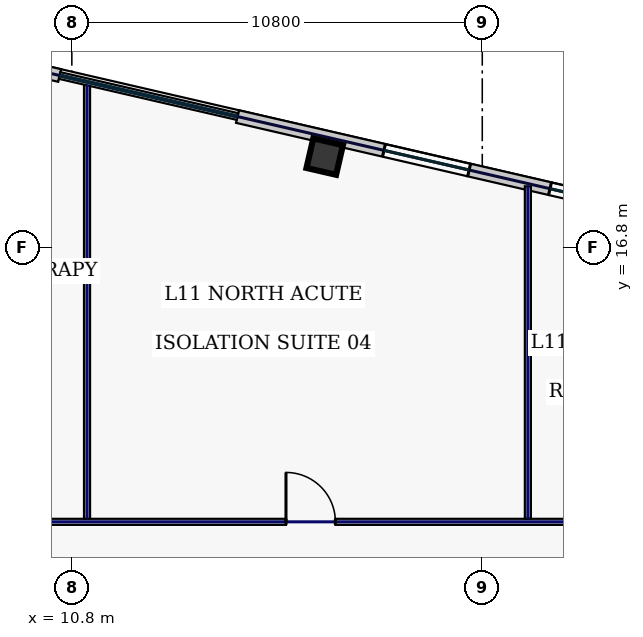
"""IFC4 building model, lengths in metres.
Left out: names, types, materials, properties, quantities, classifications, styles, units other than length and angle.
Written with IfcOpenShell. Run it as: python <this file> out.ifc"""

import sys

from ifc_helpers import new_model, si_unit, direction, frame, frame_2d, origin, origin_2d, place, context, subcontext, project, spatial, rectangle, hollow_rectangle, extrude, element, fill, save


model = new_model("IFC4")
c1 = context("Model", 3, precision=1e-05, world=origin(), true_north=direction((0.0, 1.0)))
c2 = subcontext(c1, "Body", "Model", "MODEL_VIEW")
j1 = project(units=[si_unit("LENGTHUNIT", "METRE"), si_unit("PLANEANGLEUNIT", "RADIAN")], contexts=[c1])
p1 = place(None, origin())
s1 = spatial("IfcSite", under=j1, at=p1, CompositionType="ELEMENT")
p2 = place(p1, origin())
s2 = spatial("IfcBuilding", under=s1, at=p2, CompositionType="ELEMENT")
p3 = place(p2, frame((0.0, 0.0, 55.4)))
s3 = spatial("IfcBuildingStorey", under=s2, at=p3, CompositionType="ELEMENT", Elevation=55.4)
p4 = place(p3, frame((17.454, 19.192, 0.0), z_axis=(0.0, 0.0, 1.0), x_axis=(0.974370064785, -0.224951054344, 0.0)))
e1 = element("IfcColumn", 1, at=p4, inside=s3, PredefinedType="COLUMN", context=c2, shape_type="SweptSolid", body=[
    extrude(hollow_rectangle(XDim=0.8, YDim=0.8, WallThickness=0.036, at=origin_2d()), origin(), (0.0, 0.0, 1.0), 3.74),
])
p5 = place(p3, frame((37.229, 15.15, 0.0), z_axis=(0.0, 0.0, 1.0), x_axis=(-0.97436993772, 0.224951604723, 0.0)))
e2 = element("IfcWall", 2, at=p5, inside=s3, PredefinedType="STANDARD", context=c2, shape_type="SweptSolid", body=[
    extrude(rectangle(XDim=22.651, YDim=0.34, at=frame_2d((11.326, 0.0))), origin(), (0.0, 0.0, 1.0), 3.74),
])
p6 = place(p5, frame((16.395, 0.0, 0.77)))
e3 = element("IfcOpeningElement", 3, at=p6, cuts=e2, PredefinedType="OPENING", context=c2, shape_type="SweptSolid", body=[
    extrude(rectangle(XDim=2.3, YDim=2.1, at=frame_2d((1.15, 1.05))), frame((0.0, 0.18, 0.0), z_axis=(0.0, -1.0, 0.0), x_axis=(1.0, 0.0, 0.0)), (0.0, 0.0, 1.0), 0.36),
])
p7 = place(p5, frame((11.911, 0.0, 0.77)))
e4 = element("IfcOpeningElement", 4, at=p7, cuts=e2, PredefinedType="OPENING", context=c2, shape_type="SweptSolid", body=[
    extrude(rectangle(XDim=2.3, YDim=2.1, at=frame_2d((1.15, 1.05))), frame((0.0, 0.18, 0.0), z_axis=(0.0, -1.0, 0.0), x_axis=(1.0, 0.0, 0.0)), (0.0, 0.0, 1.0), 0.36),
])
p8 = place(p5, frame((2.162, 0.0, 0.77)))
e5 = element("IfcOpeningElement", 5, at=p8, cuts=e2, PredefinedType="OPENING", context=c2, shape_type="SweptSolid", body=[
    extrude(rectangle(XDim=2.3, YDim=2.1, at=frame_2d((1.15, 1.05))), frame((0.0, 0.18, 0.0), z_axis=(0.0, -1.0, 0.0), x_axis=(1.0, 0.0, 0.0)), (0.0, 0.0, 1.0), 0.36),
])
p9 = place(p3, frame((10.481, 21.325, 0.0), z_axis=(0.0, 0.0, 1.0), x_axis=(-0.974369353393, 0.2249541357, 0.0)))
e6 = element("IfcWall", 6, at=p9, inside=s3, PredefinedType="STANDARD", context=c2, shape_type="SweptSolid", body=[
    extrude(rectangle(XDim=14.697, YDim=0.34, at=frame_2d((7.349, 0.0))), origin(), (0.0, 0.0, 1.0), 3.74),
])
p10 = place(p9, frame((8.441, 0.0, 0.77)))
e7 = element("IfcOpeningElement", 7, at=p10, cuts=e6, PredefinedType="OPENING", context=c2, shape_type="SweptSolid", body=[
    extrude(rectangle(XDim=2.3, YDim=2.1, at=frame_2d((1.15, 1.05))), frame((0.0, 0.18, 0.0), z_axis=(0.0, -1.0, 0.0), x_axis=(1.0, 0.0, 0.0)), (0.0, 0.0, 1.0), 0.36),
])
p11 = place(p9, frame((3.956, 0.0, 0.77)))
e8 = element("IfcOpeningElement", 8, at=p11, cuts=e6, PredefinedType="OPENING", context=c2, shape_type="SweptSolid", body=[
    extrude(rectangle(XDim=2.3, YDim=2.1, at=frame_2d((1.15, 1.05))), frame((0.0, 0.18, 0.0), z_axis=(0.0, -1.0, 0.0), x_axis=(1.0, 0.0, 0.0)), (0.0, 0.0, 1.0), 0.36),
])
p12 = place(p3, frame((-18.235, 9.58, 0.0), z_axis=(0.0, 0.0, 1.0), x_axis=(1.0, 0.0, 0.0)))
e9 = element("IfcWall", 9, at=p12, inside=s3, PredefinedType="PARTITIONING", context=c2, shape_type="SweptSolid", body=[
    extrude(rectangle(XDim=47.65, YDim=0.16, at=frame_2d((23.825, 0.0))), origin(), (0.0, 0.0, 1.0), 3.74),
])
p13 = place(p12, frame((2.854, 0.0, 0.0)))
e10 = element("IfcOpeningElement", 10, at=p13, cuts=e9, PredefinedType="OPENING", context=c2, shape_type="SweptSolid", body=[
    extrude(rectangle(XDim=0.95, YDim=2.2, at=frame_2d((0.475, 1.1))), frame((0.0, 0.09, 0.0), z_axis=(0.0, -1.0, 0.0), x_axis=(1.0, 0.0, 0.0)), (0.0, 0.0, 1.0), 0.18),
])
p14 = place(p12, frame((9.52, 0.0, 0.0)))
e11 = element("IfcOpeningElement", 11, at=p14, cuts=e9, PredefinedType="OPENING", context=c2, shape_type="SweptSolid", body=[
    extrude(rectangle(XDim=1.05, YDim=2.2, at=frame_2d((0.525, 1.1))), frame((0.0, 0.09, 0.0), z_axis=(0.0, -1.0, 0.0), x_axis=(1.0, 0.0, 0.0)), (0.0, 0.0, 1.0), 0.18),
])
p15 = place(p12, frame((17.42, 0.0, 0.0)))
e12 = element("IfcOpeningElement", 12, at=p15, cuts=e9, PredefinedType="OPENING", context=c2, shape_type="SweptSolid", body=[
    extrude(rectangle(XDim=0.95, YDim=2.2, at=frame_2d((0.475, 1.1))), frame((0.0, 0.09, 0.0), z_axis=(0.0, -1.0, 0.0), x_axis=(1.0, 0.0, 0.0)), (0.0, 0.0, 1.0), 0.18),
])
p16 = place(p12, frame((25.32, 0.0, 0.0)))
e13 = element("IfcOpeningElement", 13, at=p16, cuts=e9, PredefinedType="OPENING", context=c2, shape_type="SweptSolid", body=[
    extrude(rectangle(XDim=0.95, YDim=2.2, at=frame_2d((0.475, 1.1))), frame((0.0, 0.09, 0.0), z_axis=(0.0, -1.0, 0.0), x_axis=(1.0, 0.0, 0.0)), (0.0, 0.0, 1.0), 0.18),
])
p17 = place(p12, frame((34.67, 0.0, 0.0)))
e14 = element("IfcOpeningElement", 14, at=p17, cuts=e9, PredefinedType="OPENING", context=c2, shape_type="SweptSolid", body=[
    extrude(rectangle(XDim=1.3, YDim=2.2, at=frame_2d((0.65, 1.1))), frame((0.0, 0.09, 0.0), z_axis=(0.0, -1.0, 0.0), x_axis=(1.0, 0.0, 0.0)), (0.0, 0.0, 1.0), 0.18),
])
p18 = place(p12, frame((43.626, 0.0, 0.0)))
e15 = element("IfcOpeningElement", 15, at=p18, cuts=e9, PredefinedType="OPENING", context=c2, shape_type="SweptSolid", body=[
    extrude(rectangle(XDim=1.3, YDim=2.2, at=frame_2d((0.65, 1.1))), frame((0.0, 0.09, 0.0), z_axis=(0.0, -1.0, 0.0), x_axis=(1.0, 0.0, 0.0)), (0.0, 0.0, 1.0), 0.18),
])
p19 = place(p3, frame((11.2, 9.665, 0.0), z_axis=(0.0, 0.0, 1.0), x_axis=(0.0, 1.0, 0.0)))
e16 = element("IfcWall", 16, at=p19, inside=s3, PredefinedType="PARTITIONING", context=c2, shape_type="SweptSolid", body=[
    extrude(rectangle(XDim=11.422, YDim=0.16, at=frame_2d((5.711, 0.0))), origin(), (0.0, 0.0, 1.0), 3.74),
])
p20 = place(p3, frame((22.8, 9.665, 0.0), z_axis=(0.0, 0.0, 1.0), x_axis=(0.0, 1.0, 0.0)))
e17 = element("IfcWall", 17, at=p20, inside=s3, PredefinedType="PARTITIONING", context=c2, shape_type="SweptSolid", body=[
    extrude(rectangle(XDim=8.744, YDim=0.16, at=frame_2d((4.372, 0.0))), origin(), (0.0, 0.0, 1.0), 3.74),
])
p21 = place(p6, origin())
e18 = element("IfcWindow", 18, at=p21, inside=s3, PartitioningType="SINGLE_PANEL", PredefinedType="WINDOW", context=c2, shape_type="SweptSolid", body=[
    extrude(rectangle(XDim=2.3, YDim=2.1, at=frame_2d((1.15, 1.05))), frame((0.0, 0.03, 0.0), z_axis=(0.0, -1.0, 0.0), x_axis=(1.0, 0.0, 0.0)), (0.0, 0.0, 1.0), 0.06),
])
fill(e3, e18)
p22 = place(p7, origin())
e19 = element("IfcWindow", 19, at=p22, inside=s3, PartitioningType="SINGLE_PANEL", PredefinedType="WINDOW", context=c2, shape_type="SweptSolid", body=[
    extrude(rectangle(XDim=2.3, YDim=2.1, at=frame_2d((1.15, 1.05))), frame((0.0, 0.03, 0.0), z_axis=(0.0, -1.0, 0.0), x_axis=(1.0, 0.0, 0.0)), (0.0, 0.0, 1.0), 0.06),
])
fill(e4, e19)
p23 = place(p17, origin())
e20 = element("IfcDoor", 20, at=p23, inside=s3, OperationType="SINGLE_SWING_LEFT", PredefinedType="DOOR", context=c2, shape_type="SweptSolid", body=[
    extrude(rectangle(XDim=1.3, YDim=2.2, at=frame_2d((0.65, 1.1))), frame((0.0, 0.025, 0.0), z_axis=(0.0, -1.0, 0.0), x_axis=(1.0, 0.0, 0.0)), (0.0, 0.0, 1.0), 0.05),
])
fill(e14, e20)
save(model, sys.argv[1])
